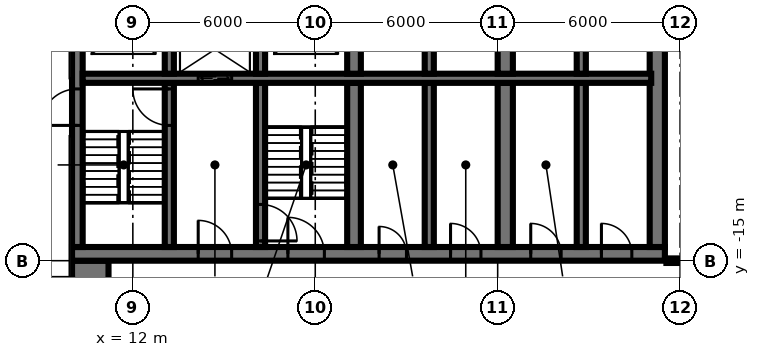
"""IFC4 building model, lengths in metres.
Left out: names, types, materials, properties, quantities, classifications, styles, units other than length and angle.
Written with IfcOpenShell. Run it as: python <this file> out.ifc"""

import sys

from ifc_helpers import new_model, si_unit, direction, frame, frame_2d, origin, place, context, subcontext, project, spatial, rectangle, extrude, element, fill, save


model = new_model("IFC4")
c1 = context("Model", 3, precision=1e-05, world=origin(), true_north=direction((0.0, 1.0)))
c2 = subcontext(c1, "Body", "Model", "MODEL_VIEW")
j1 = project(units=[si_unit("LENGTHUNIT", "METRE"), si_unit("PLANEANGLEUNIT", "RADIAN")], contexts=[c1])
p1 = place(None, origin())
s1 = spatial("IfcSite", under=j1, at=p1, CompositionType="ELEMENT")
p2 = place(p1, origin())
s2 = spatial("IfcBuilding", under=s1, at=p2, CompositionType="ELEMENT")
p3 = place(p2, origin())
s3 = spatial("IfcBuildingStorey", under=s2, at=p3, CompositionType="ELEMENT", Elevation=0.0)
p4 = place(p3, frame((10.0, -14.775, -0.3), z_axis=(0.0, 0.0, 1.0), x_axis=(1.0, 0.0, 0.0)))
e1 = element("IfcWall", 1, at=p4, inside=s3, PredefinedType="SHEAR", context=c2, shape_type="SweptSolid", body=[
    extrude(rectangle(XDim=19.5, YDim=0.45, at=frame_2d((9.75, 0.0))), origin(), (0.0, 0.0, 1.0), 7.3),
])
p5 = place(p4, frame((7.1, 0.0, 0.3)))
e2 = element("IfcOpeningElement", 2, at=p5, cuts=e1, PredefinedType="OPENING", context=c2, shape_type="SweptSolid", body=[
    extrude(rectangle(XDim=1.2, YDim=2.1, at=frame_2d((0.6, 1.05))), frame((0.0, 0.235, 0.0), z_axis=(0.0, -1.0, 0.0), x_axis=(1.0, 0.0, 0.0)), (0.0, 0.0, 1.0), 0.47),
])
p6 = place(p4, frame((4.15, 0.0, 0.3)))
e3 = element("IfcOpeningElement", 3, at=p6, cuts=e1, PredefinedType="OPENING", context=c2, shape_type="SweptSolid", body=[
    extrude(rectangle(XDim=1.1, YDim=2.1, at=frame_2d((0.55, 1.05))), frame((0.0, 0.235, 0.0), z_axis=(0.0, -1.0, 0.0), x_axis=(1.0, 0.0, 0.0)), (0.0, 0.0, 1.0), 0.47),
])
p7 = place(p4, frame((10.1, 0.0, 0.3)))
e4 = element("IfcOpeningElement", 4, at=p7, cuts=e1, PredefinedType="OPENING", context=c2, shape_type="SweptSolid", body=[
    extrude(rectangle(XDim=0.9, YDim=2.1, at=frame_2d((0.45, 1.05))), frame((0.0, 0.235, 0.0), z_axis=(0.0, -1.0, 0.0), x_axis=(1.0, 0.0, 0.0)), (0.0, 0.0, 1.0), 0.47),
])
p8 = place(p4, frame((12.45, 0.0, 0.3)))
e5 = element("IfcOpeningElement", 5, at=p8, cuts=e1, PredefinedType="OPENING", context=c2, shape_type="SweptSolid", body=[
    extrude(rectangle(XDim=1.0, YDim=2.1, at=frame_2d((0.5, 1.05))), frame((0.0, 0.235, 0.0), z_axis=(0.0, -1.0, 0.0), x_axis=(1.0, 0.0, 0.0)), (0.0, 0.0, 1.0), 0.47),
])
p9 = place(p4, frame((15.087, 0.0, 0.3)))
e6 = element("IfcOpeningElement", 6, at=p9, cuts=e1, PredefinedType="OPENING", context=c2, shape_type="SweptSolid", body=[
    extrude(rectangle(XDim=1.0, YDim=2.1, at=frame_2d((0.5, 1.05))), frame((0.0, 0.235, 0.0), z_axis=(0.0, -1.0, 0.0), x_axis=(1.0, 0.0, 0.0)), (0.0, 0.0, 1.0), 0.47),
])
p10 = place(p4, frame((17.413, 0.0, 0.3)))
e7 = element("IfcOpeningElement", 7, at=p10, cuts=e1, PredefinedType="OPENING", context=c2, shape_type="SweptSolid", body=[
    extrude(rectangle(XDim=1.0, YDim=2.1, at=frame_2d((0.5, 1.05))), frame((0.0, 0.235, 0.0), z_axis=(0.0, -1.0, 0.0), x_axis=(1.0, 0.0, 0.0)), (0.0, 0.0, 1.0), 0.47),
])
p11 = place(p3, frame((10.175, -14.55, -0.3), z_axis=(0.0, 0.0, 1.0), x_axis=(0.0, 1.0, 0.0)))
e8 = element("IfcWall", 8, at=p11, inside=s3, PredefinedType="SHEAR", context=c2, shape_type="SweptSolid", body=[
    extrude(rectangle(XDim=14.1, YDim=0.35, at=frame_2d((7.05, 0.0))), origin(), (0.0, 0.0, 1.0), 7.3),
])
p12 = place(p11, frame((8.4, 0.0, 0.3)))
e9 = element("IfcOpeningElement", 9, at=p12, cuts=e8, PredefinedType="OPENING", context=c2, shape_type="SweptSolid", body=[
    extrude(rectangle(XDim=1.4, YDim=2.4, at=frame_2d((0.7, 1.2))), frame((0.0, 0.185, 0.0), z_axis=(0.0, -1.0, 0.0), x_axis=(1.0, 0.0, 0.0)), (0.0, 0.0, 1.0), 0.37),
])
p13 = place(p11, frame((10.0, 0.0, 0.3)))
e10 = element("IfcOpeningElement", 10, at=p13, cuts=e8, PredefinedType="OPENING", context=c2, shape_type="SweptSolid", body=[
    extrude(rectangle(XDim=1.4, YDim=2.4, at=frame_2d((0.7, 1.2))), frame((0.0, 0.185, 0.0), z_axis=(0.0, -1.0, 0.0), x_axis=(1.0, 0.0, 0.0)), (0.0, 0.0, 1.0), 0.37),
])
p14 = place(p11, frame((4.0, 0.0, 0.3)))
e11 = element("IfcOpeningElement", 11, at=p14, cuts=e8, PredefinedType="OPENING", context=c2, shape_type="SweptSolid", body=[
    extrude(rectangle(XDim=1.2, YDim=2.1, at=frame_2d((0.6, 1.05))), frame((0.0, 0.185, 0.0), z_axis=(0.0, -1.0, 0.0), x_axis=(1.0, 0.0, 0.0)), (0.0, 0.0, 1.0), 0.37),
])
p15 = place(p3, frame((29.25, -14.55, -0.3), z_axis=(0.0, 0.0, 1.0), x_axis=(0.0, 1.0, 0.0)))
e12 = element("IfcWall", 12, at=p15, inside=s3, PredefinedType="SHEAR", context=c2, shape_type="SweptSolid", body=[
    extrude(rectangle(XDim=14.1, YDim=0.5, at=frame_2d((7.05, 0.0))), origin(), (0.0, 0.0, 1.0), 7.3),
])
p16 = place(p3, frame((10.35, -9.0, -0.3), z_axis=(0.0, 0.0, 1.0), x_axis=(1.0, 0.0, 0.0)))
e13 = element("IfcWall", 13, at=p16, inside=s3, PredefinedType="SHEAR", context=c2, shape_type="SweptSolid", body=[
    extrude(rectangle(XDim=18.7, YDim=0.3, at=frame_2d((9.35, 0.0))), origin(), (0.0, 0.0, 1.0), 7.3),
])
p17 = place(p16, frame((3.8, 0.0, 0.3)))
e14 = element("IfcOpeningElement", 14, at=p17, cuts=e13, PredefinedType="OPENING", context=c2, shape_type="SweptSolid", body=[
    extrude(rectangle(XDim=1.1, YDim=2.1, at=frame_2d((0.55, 1.05))), frame((0.0, 0.16, 0.0), z_axis=(0.0, -1.0, 0.0), x_axis=(1.0, 0.0, 0.0)), (0.0, 0.0, 1.0), 0.32),
])
p18 = place(p3, frame((13.2, -8.85, -0.3), z_axis=(0.0, 0.0, 1.0), x_axis=(0.0, 1.0, 0.0)))
e15 = element("IfcWall", 15, at=p18, inside=s3, PredefinedType="SHEAR", context=c2, shape_type="SweptSolid", body=[
    extrude(rectangle(XDim=2.3, YDim=0.3, at=frame_2d((1.15, 0.0))), origin(), (0.0, 0.0, 1.0), 7.3),
])
p19 = place(p3, frame((13.2, -14.55, -0.3), z_axis=(0.0, 0.0, 1.0), x_axis=(0.0, 1.0, 0.0)))
e16 = element("IfcWall", 16, at=p19, inside=s3, PredefinedType="SHEAR", context=c2, shape_type="SweptSolid", body=[
    extrude(rectangle(XDim=5.4, YDim=0.3, at=frame_2d((2.7, 0.0))), origin(), (0.0, 0.0, 1.0), 7.3),
])
p20 = place(p19, frame((4.0, 0.0, 0.3)))
e17 = element("IfcOpeningElement", 17, at=p20, cuts=e16, PredefinedType="OPENING", context=c2, shape_type="SweptSolid", body=[
    extrude(rectangle(XDim=1.2, YDim=2.1, at=frame_2d((0.6, 1.05))), frame((0.0, 0.16, 0.0), z_axis=(0.0, -1.0, 0.0), x_axis=(1.0, 0.0, 0.0)), (0.0, 0.0, 1.0), 0.32),
])
p21 = place(p3, frame((16.2, -8.85, -0.3), z_axis=(0.0, 0.0, 1.0), x_axis=(0.0, 1.0, 0.0)))
e18 = element("IfcWall", 18, at=p21, inside=s3, PredefinedType="SHEAR", context=c2, shape_type="SweptSolid", body=[
    extrude(rectangle(XDim=2.3, YDim=0.3, at=frame_2d((1.15, 0.0))), origin(), (0.0, 0.0, 1.0), 7.3),
])
p22 = place(p3, frame((16.2, -14.55, -0.3), z_axis=(0.0, 0.0, 1.0), x_axis=(0.0, 1.0, 0.0)))
e19 = element("IfcWall", 19, at=p22, inside=s3, PredefinedType="SHEAR", context=c2, shape_type="SweptSolid", body=[
    extrude(rectangle(XDim=5.4, YDim=0.3, at=frame_2d((2.7, 0.0))), origin(), (0.0, 0.0, 1.0), 7.3),
])
p23 = place(p22, frame((0.2, 0.0, 0.3)))
e20 = element("IfcOpeningElement", 20, at=p23, cuts=e19, PredefinedType="OPENING", context=c2, shape_type="SweptSolid", body=[
    extrude(rectangle(XDim=1.2, YDim=2.1, at=frame_2d((0.6, 1.05))), frame((0.0, 0.16, 0.0), z_axis=(0.0, -1.0, 0.0), x_axis=(1.0, 0.0, 0.0)), (0.0, 0.0, 1.0), 0.32),
])
p24 = place(p3, frame((19.275, -8.85, -0.3), z_axis=(0.0, 0.0, 1.0), x_axis=(0.0, 1.0, 0.0)))
e21 = element("IfcWall", 21, at=p24, inside=s3, PredefinedType="SHEAR", context=c2, shape_type="SweptSolid", body=[
    extrude(rectangle(XDim=2.3, YDim=0.45, at=frame_2d((1.15, 0.0))), origin(), (0.0, 0.0, 1.0), 7.3),
])
p25 = place(p3, frame((19.275, -14.55, -0.3), z_axis=(0.0, 0.0, 1.0), x_axis=(0.0, 1.0, 0.0)))
e22 = element("IfcWall", 22, at=p25, inside=s3, PredefinedType="SHEAR", context=c2, shape_type="SweptSolid", body=[
    extrude(rectangle(XDim=5.4, YDim=0.45, at=frame_2d((2.7, 0.0))), origin(), (0.0, 0.0, 1.0), 7.3),
])
p26 = place(p3, frame((21.75, -8.85, -0.3), z_axis=(0.0, 0.0, 1.0), x_axis=(0.0, 1.0, 0.0)))
e23 = element("IfcWall", 23, at=p26, inside=s3, PredefinedType="SHEAR", context=c2, shape_type="SweptSolid", body=[
    extrude(rectangle(XDim=2.3, YDim=0.3, at=frame_2d((1.15, 0.0))), origin(), (0.0, 0.0, 1.0), 7.3),
])
p27 = place(p3, frame((21.75, -14.55, -0.3), z_axis=(0.0, 0.0, 1.0), x_axis=(0.0, 1.0, 0.0)))
e24 = element("IfcWall", 24, at=p27, inside=s3, PredefinedType="SHEAR", context=c2, shape_type="SweptSolid", body=[
    extrude(rectangle(XDim=5.4, YDim=0.3, at=frame_2d((2.7, 0.0))), origin(), (0.0, 0.0, 1.0), 7.3),
])
p28 = place(p3, frame((24.25, -8.85, -0.3), z_axis=(0.0, 0.0, 1.0), x_axis=(0.0, 1.0, 0.0)))
e25 = element("IfcWall", 25, at=p28, inside=s3, PredefinedType="SHEAR", context=c2, shape_type="SweptSolid", body=[
    extrude(rectangle(XDim=2.3, YDim=0.5, at=frame_2d((1.15, 0.0))), origin(), (0.0, 0.0, 1.0), 7.3),
])
p29 = place(p3, frame((24.25, -14.55, -0.3), z_axis=(0.0, 0.0, 1.0), x_axis=(0.0, 1.0, 0.0)))
e26 = element("IfcWall", 26, at=p29, inside=s3, PredefinedType="SHEAR", context=c2, shape_type="SweptSolid", body=[
    extrude(rectangle(XDim=5.4, YDim=0.5, at=frame_2d((2.7, 0.0))), origin(), (0.0, 0.0, 1.0), 7.3),
])
p30 = place(p3, frame((26.75, -8.85, -0.3), z_axis=(0.0, 0.0, 1.0), x_axis=(0.0, 1.0, 0.0)))
e27 = element("IfcWall", 27, at=p30, inside=s3, PredefinedType="SHEAR", context=c2, shape_type="SweptSolid", body=[
    extrude(rectangle(XDim=2.3, YDim=0.3, at=frame_2d((1.15, 0.0))), origin(), (0.0, 0.0, 1.0), 7.3),
])
p31 = place(p3, frame((26.75, -14.55, -0.3), z_axis=(0.0, 0.0, 1.0), x_axis=(0.0, 1.0, 0.0)))
e28 = element("IfcWall", 28, at=p31, inside=s3, PredefinedType="SHEAR", context=c2, shape_type="SweptSolid", body=[
    extrude(rectangle(XDim=5.4, YDim=0.3, at=frame_2d((2.7, 0.0))), origin(), (0.0, 0.0, 1.0), 7.3),
])
p32 = place(p3, frame((10.6, -40.0, -0.3), z_axis=(0.0, 0.0, 1.0), x_axis=(0.0, 1.0, 0.0)))
e29 = element("IfcWall", 29, at=p32, inside=s3, PredefinedType="SHEAR", context=c2, shape_type="SweptSolid", body=[
    extrude(rectangle(XDim=25.0, YDim=1.2, at=frame_2d((12.5, 0.0))), origin(), (0.0, 0.0, 1.0), 7.3),
])
p33 = place(p32, frame((8.8, 0.0, 0.3)))
e30 = element("IfcOpeningElement", 30, at=p33, cuts=e29, PredefinedType="OPENING", context=c2, shape_type="SweptSolid", body=[
    extrude(rectangle(XDim=2.4, YDim=2.7, at=frame_2d((1.2, 1.35))), frame((0.0, 0.61, 0.0), z_axis=(0.0, -1.0, 0.0), x_axis=(1.0, 0.0, 0.0)), (0.0, 0.0, 1.0), 1.22),
])
p34 = place(p3, frame((29.55, -15.0, 0.0), z_axis=(0.0, 0.0, 1.0), x_axis=(1.0, 0.0, 0.0)))
e31 = element("IfcWall", 31, at=p34, inside=s3, PredefinedType="PARTITIONING", context=c2, shape_type="SweptSolid", body=[
    extrude(rectangle(XDim=18.27, YDim=0.15, at=frame_2d((9.135, 0.0))), origin(), (0.0, 0.0, 1.0), 6.55),
])
p35 = place(p34, frame((15.65, 0.0, 0.0)))
e32 = element("IfcOpeningElement", 32, at=p35, cuts=e31, PredefinedType="OPENING", context=c2, shape_type="SweptSolid", body=[
    extrude(rectangle(XDim=1.0, YDim=2.1, at=frame_2d((0.5, 1.05))), frame((0.0, 0.085, 0.0), z_axis=(0.0, -1.0, 0.0), x_axis=(1.0, 0.0, 0.0)), (0.0, 0.0, 1.0), 0.17),
])
p36 = place(p34, frame((13.47, 0.0, 0.0)))
e33 = element("IfcOpeningElement", 33, at=p36, cuts=e31, PredefinedType="OPENING", context=c2, shape_type="SweptSolid", body=[
    extrude(rectangle(XDim=1.0, YDim=2.1, at=frame_2d((0.5, 1.05))), frame((0.0, 0.085, 0.0), z_axis=(0.0, -1.0, 0.0), x_axis=(1.0, 0.0, 0.0)), (0.0, 0.0, 1.0), 0.17),
])
p37 = place(p34, frame((8.97, 0.0, 0.0)))
e34 = element("IfcOpeningElement", 34, at=p37, cuts=e31, PredefinedType="OPENING", context=c2, shape_type="SweptSolid", body=[
    extrude(rectangle(XDim=1.0, YDim=2.1, at=frame_2d((0.5, 1.05))), frame((0.0, 0.085, 0.0), z_axis=(0.0, -1.0, 0.0), x_axis=(1.0, 0.0, 0.0)), (0.0, 0.0, 1.0), 0.17),
])
p38 = place(p34, frame((2.72, 0.0, 0.0)))
e35 = element("IfcOpeningElement", 35, at=p38, cuts=e31, PredefinedType="OPENING", context=c2, shape_type="SweptSolid", body=[
    extrude(rectangle(XDim=1.0, YDim=2.1, at=frame_2d((0.5, 1.05))), frame((0.0, 0.085, 0.0), z_axis=(0.0, -1.0, 0.0), x_axis=(1.0, 0.0, 0.0)), (0.0, 0.0, 1.0), 0.17),
])
p39 = place(p17, origin())
e36 = element("IfcDoor", 36, at=p39, inside=s3, OperationType="DOUBLE_DOOR_SLIDING", PredefinedType="USERDEFINED", context=c2, shape_type="SweptSolid", body=[
    extrude(rectangle(XDim=1.1, YDim=2.1, at=frame_2d((0.55, 1.05))), frame((0.0, 0.025, 0.0), z_axis=(0.0, -1.0, 0.0), x_axis=(1.0, 0.0, 0.0)), (0.0, 0.0, 1.0), 0.05),
])
fill(e14, e36)
p40 = place(p14, origin())
e37 = element("IfcDoor", 37, at=p40, inside=s3, OperationType="SINGLE_SWING_RIGHT", PredefinedType="DOOR", context=c2, shape_type="SweptSolid", body=[
    extrude(rectangle(XDim=1.2, YDim=2.1, at=frame_2d((0.6, 1.05))), frame((0.0, 0.025, 0.0), z_axis=(0.0, -1.0, 0.0), x_axis=(1.0, 0.0, 0.0)), (0.0, 0.0, 1.0), 0.05),
])
fill(e11, e37)
p41 = place(p5, origin())
e38 = element("IfcDoor", 38, at=p41, inside=s3, OperationType="SINGLE_SWING_RIGHT", PredefinedType="DOOR", context=c2, shape_type="SweptSolid", body=[
    extrude(rectangle(XDim=1.2, YDim=2.1, at=frame_2d((0.6, 1.05))), frame((0.0, 0.025, 0.0), z_axis=(0.0, -1.0, 0.0), x_axis=(1.0, 0.0, 0.0)), (0.0, 0.0, 1.0), 0.05),
])
fill(e2, e38)
p42 = place(p6, origin())
e39 = element("IfcDoor", 39, at=p42, inside=s3, OperationType="SINGLE_SWING_RIGHT", PredefinedType="DOOR", context=c2, shape_type="SweptSolid", body=[
    extrude(rectangle(XDim=1.1, YDim=2.1, at=frame_2d((0.55, 1.05))), frame((0.0, 0.025, 0.0), z_axis=(0.0, -1.0, 0.0), x_axis=(1.0, 0.0, 0.0)), (0.0, 0.0, 1.0), 0.05),
])
fill(e3, e39)
p43 = place(p7, origin())
e40 = element("IfcDoor", 40, at=p43, inside=s3, OperationType="SINGLE_SWING_RIGHT", PredefinedType="DOOR", context=c2, shape_type="SweptSolid", body=[
    extrude(rectangle(XDim=0.9, YDim=2.1, at=frame_2d((0.45, 1.05))), frame((0.0, 0.025, 0.0), z_axis=(0.0, -1.0, 0.0), x_axis=(1.0, 0.0, 0.0)), (0.0, 0.0, 1.0), 0.05),
])
fill(e4, e40)
p44 = place(p8, origin())
e41 = element("IfcDoor", 41, at=p44, inside=s3, OperationType="SINGLE_SWING_RIGHT", PredefinedType="DOOR", context=c2, shape_type="SweptSolid", body=[
    extrude(rectangle(XDim=1.0, YDim=2.1, at=frame_2d((0.5, 1.05))), frame((0.0, 0.025, 0.0), z_axis=(0.0, -1.0, 0.0), x_axis=(1.0, 0.0, 0.0)), (0.0, 0.0, 1.0), 0.05),
])
fill(e5, e41)
p45 = place(p9, origin())
e42 = element("IfcDoor", 42, at=p45, inside=s3, OperationType="SINGLE_SWING_RIGHT", PredefinedType="DOOR", context=c2, shape_type="SweptSolid", body=[
    extrude(rectangle(XDim=1.0, YDim=2.1, at=frame_2d((0.5, 1.05))), frame((0.0, 0.025, 0.0), z_axis=(0.0, -1.0, 0.0), x_axis=(1.0, 0.0, 0.0)), (0.0, 0.0, 1.0), 0.05),
])
fill(e6, e42)
p46 = place(p10, origin())
e43 = element("IfcDoor", 43, at=p46, inside=s3, OperationType="SINGLE_SWING_RIGHT", PredefinedType="DOOR", context=c2, shape_type="SweptSolid", body=[
    extrude(rectangle(XDim=1.0, YDim=2.1, at=frame_2d((0.5, 1.05))), frame((0.0, 0.025, 0.0), z_axis=(0.0, -1.0, 0.0), x_axis=(1.0, 0.0, 0.0)), (0.0, 0.0, 1.0), 0.05),
])
fill(e7, e43)
p47 = place(p20, origin())
e44 = element("IfcDoor", 44, at=p47, inside=s3, OperationType="SINGLE_SWING_LEFT", PredefinedType="DOOR", context=c2, shape_type="SweptSolid", body=[
    extrude(rectangle(XDim=1.2, YDim=2.1, at=frame_2d((0.6, 1.05))), frame((0.0, 0.025, 0.0), z_axis=(0.0, -1.0, 0.0), x_axis=(1.0, 0.0, 0.0)), (0.0, 0.0, 1.0), 0.05),
])
fill(e17, e44)
p48 = place(p23, frame((0.6, 0.0, 0.0), z_axis=(0.0, 0.0, 1.0), x_axis=(-1.0, 0.0, 0.0)))
e45 = element("IfcDoor", 45, at=p48, inside=s3, OperationType="SINGLE_SWING_LEFT", PredefinedType="DOOR", context=c2, shape_type="SweptSolid", body=[
    extrude(rectangle(XDim=1.2, YDim=2.1, at=frame_2d((0.0, 1.05))), frame((0.0, -0.025, 0.0), z_axis=(0.0, 1.0, 0.0), x_axis=(-1.0, 0.0, 0.0)), (0.0, 0.0, 1.0), 0.05),
])
fill(e20, e45)
save(model, sys.argv[1])
